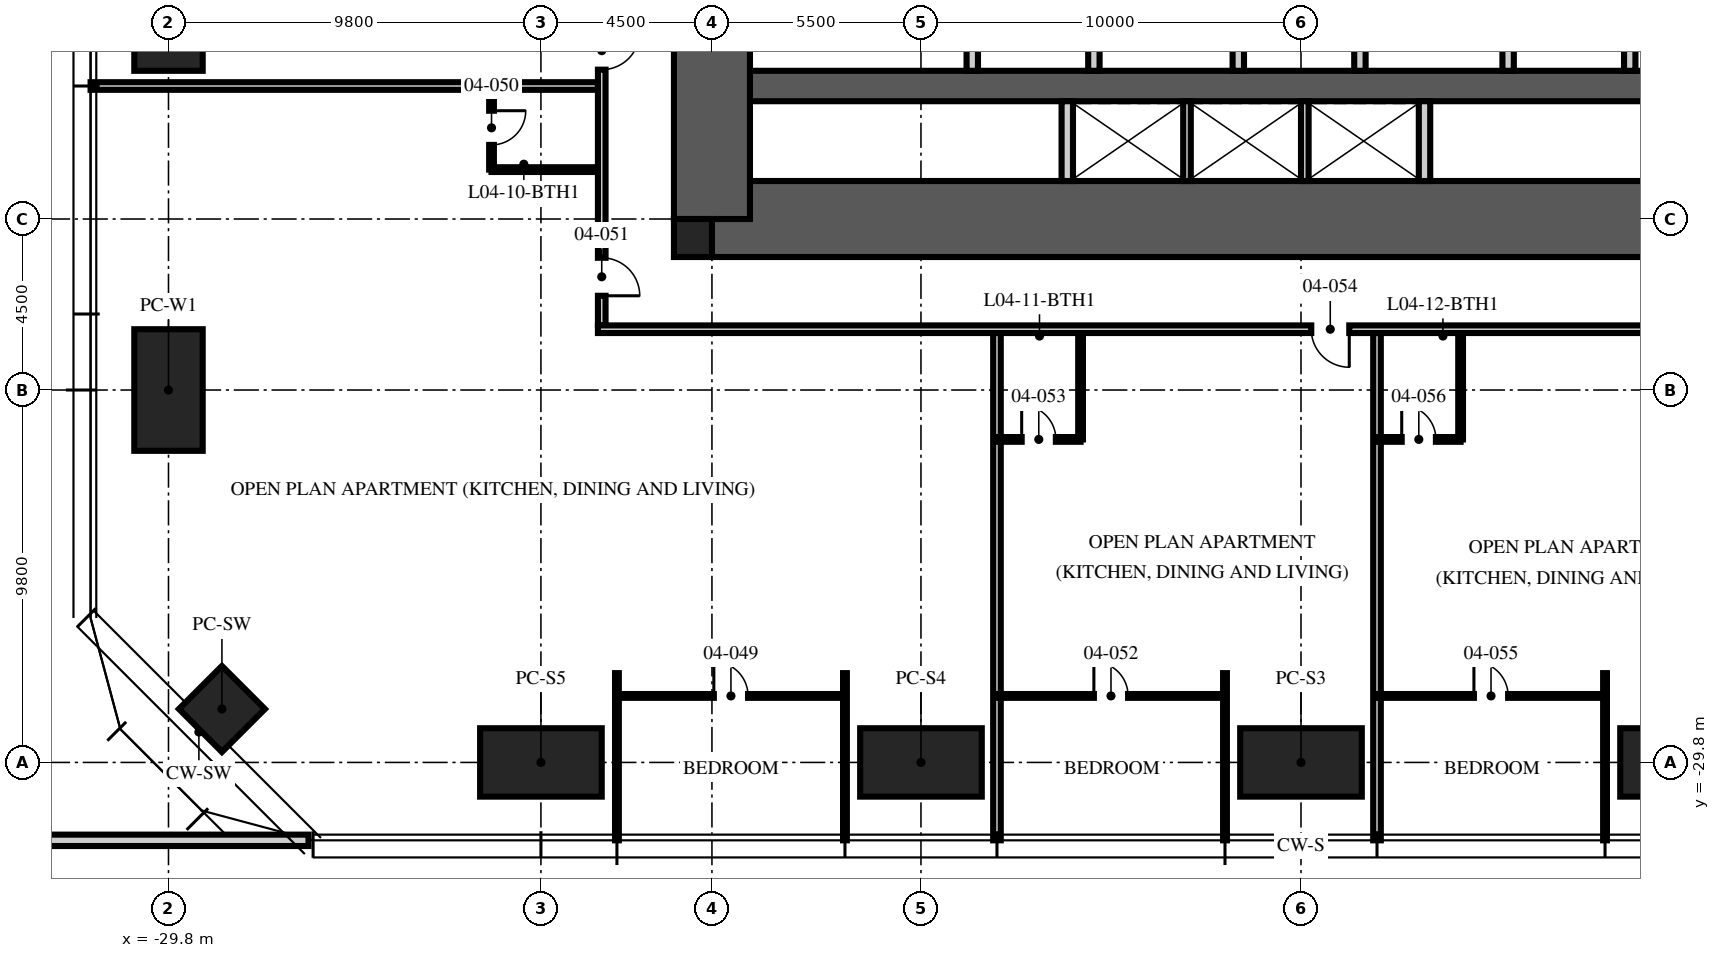
"""IFC4 building model, lengths in metres.
Left out: names, types, materials, properties, quantities, classifications, styles, units other than length and angle.
Written with IfcOpenShell. Run it as: python <this file> out.ifc"""

import sys

from ifc_helpers import new_model, si_unit, direction, frame, frame_2d, origin, origin_2d, place, context, subcontext, project, spatial, rectangle, hollow_rectangle, extrude, element, fill, save


model = new_model("IFC4")
c1 = context("Model", 3, precision=1e-05, world=origin(), true_north=direction((0.0, 1.0)))
c2 = subcontext(c1, "Body", "Model", "MODEL_VIEW")
j1 = project(units=[si_unit("LENGTHUNIT", "METRE"), si_unit("PLANEANGLEUNIT", "RADIAN")], contexts=[c1])
p1 = place(None, origin())
s1 = spatial("IfcSite", under=j1, at=p1, CompositionType="ELEMENT")
p2 = place(p1, origin())
s2 = spatial("IfcBuilding", under=s1, at=p2, CompositionType="ELEMENT")
p3 = place(p2, frame((0.0, 0.0, 21.0)))
s3 = spatial("IfcBuildingStorey", under=s2, at=p3, CompositionType="ELEMENT", Elevation=21.0)
p4 = place(p3, frame((-15.5, -15.5, -0.25), z_axis=(0.0, 0.0, 1.0), x_axis=(1.0, 0.0, 0.0)))
e1 = element("IfcWall", 1, at=p4, inside=s3, PredefinedType="SHEAR", context=c2, shape_type="SweptSolid", body=[
    extrude(rectangle(XDim=31.0, YDim=2.0, at=frame_2d((15.5, 0.0))), origin(), (0.0, 0.0, 1.0), 3.75),
])
p5 = place(p3, frame((-15.5, -12.0, -0.25), z_axis=(0.0, 0.0, 1.0), x_axis=(1.0, 0.0, 0.0)))
e2 = element("IfcWall", 2, at=p5, inside=s3, PredefinedType="SHEAR", context=c2, shape_type="SweptSolid", body=[
    extrude(rectangle(XDim=31.0, YDim=0.8, at=frame_2d((15.5, 0.0))), origin(), (0.0, 0.0, 1.0), 3.75),
])
p6 = place(p3, frame((-15.5, -15.5, -0.25), z_axis=(0.0, 0.0, 1.0), x_axis=(0.0, 1.0, 0.0)))
e3 = element("IfcWall", 3, at=p6, inside=s3, PredefinedType="SHEAR", context=c2, shape_type="SweptSolid", body=[
    extrude(rectangle(XDim=31.0, YDim=2.0, at=frame_2d((15.5, 0.0))), origin(), (0.0, 0.0, 1.0), 3.75),
])
p7 = place(p6, frame((6.5, 0.0, 0.25)))
e4 = element("IfcOpeningElement", 4, at=p7, cuts=e3, PredefinedType="OPENING", context=c2, shape_type="SweptSolid", body=[
    extrude(rectangle(XDim=1.2, YDim=2.1, at=frame_2d((0.6, 1.05))), frame((0.0, 1.01, 0.0), z_axis=(0.0, -1.0, 0.0), x_axis=(1.0, 0.0, 0.0)), (0.0, 0.0, 1.0), 2.02),
])
p8 = place(p6, frame((23.0, 0.0, 0.25)))
e5 = element("IfcOpeningElement", 5, at=p8, cuts=e3, PredefinedType="OPENING", context=c2, shape_type="SweptSolid", body=[
    extrude(rectangle(XDim=1.8, YDim=2.1, at=frame_2d((0.9, 1.05))), frame((0.0, 1.01, 0.0), z_axis=(0.0, -1.0, 0.0), x_axis=(1.0, 0.0, 0.0)), (0.0, 0.0, 1.0), 2.02),
])
p9 = place(p3, frame((-16.0, -16.0, -0.25), z_axis=(0.0, 0.0, 1.0), x_axis=(1.0, 0.0, 0.0)))
e6 = element("IfcColumn", 6, at=p9, inside=s3, PredefinedType="COLUMN", context=c2, shape_type="SweptSolid", body=[
    extrude(rectangle(XDim=1.0, YDim=1.0, at=origin_2d()), origin(), (0.0, 0.0, 1.0), 3.75),
])
for number, where, z_axis, x_axis in (
    (7, (10.0, -29.8, 0.0), (0.0, 0.0, 1.0), (1.0, 0.0, 0.0)),
    (8, (0.0, -29.8, 0.0), (0.0, 0.0, 1.0), (1.0, 0.0, 0.0)),
    (9, (-10.0, -29.8, 0.0), (0.0, 0.0, 1.0), (1.0, 0.0, 0.0)),
    (10, (-20.0, -29.8, 0.0), (0.0, 0.0, 1.0), (1.0, 0.0, 0.0)),
    (11, (-29.8, -20.0, 0.0), (0.0, 0.0, 1.0), (0.0, 1.0, 0.0)),
    (12, (-29.8, -10.0, 0.0), (0.0, 0.0, 1.0), (0.0, 1.0, 0.0)),
):
    element("IfcColumn", number, at=place(p3, frame(where, z_axis=z_axis, x_axis=x_axis)), inside=s3, PredefinedType="COLUMN", context=c2, shape_type="SweptSolid", body=[
        extrude(hollow_rectangle(XDim=3.2, YDim=1.8, WallThickness=0.2, at=origin_2d()), origin(), (0.0, 0.0, 1.0), 3.75),
    ])
p10 = place(p3, frame((-28.394, -28.394, 0.0), z_axis=(0.0, 0.0, 1.0), x_axis=(0.707106781187, -0.707106781187, 0.0)))
e13 = element("IfcColumn", 13, at=p10, inside=s3, PredefinedType="COLUMN", context=c2, shape_type="SweptSolid", body=[
    extrude(hollow_rectangle(XDim=1.6, YDim=1.6, WallThickness=0.1, at=origin_2d()), origin(), (0.0, 0.0, 1.0), 3.75),
])
p11 = place(p3, frame((-38.0, -31.85, 0.0), z_axis=(0.0, 0.0, 1.0), x_axis=(1.0, 0.0, 0.0)))
e14 = element("IfcWall", 14, at=p11, inside=s3, PredefinedType="PARAPET", context=c2, shape_type="SweptSolid", body=[
    extrude(rectangle(XDim=11.884, YDim=0.3, at=frame_2d((5.942, 0.0))), origin(), (0.0, 0.0, 1.0), 1.2),
])
p12 = place(p3, frame((-8.65, -11.6, 0.0), z_axis=(0.0, 0.0, 1.0), x_axis=(0.0, 1.0, 0.0)))
e15 = element("IfcWall", 15, at=p12, inside=s3, PredefinedType="PARTITIONING", context=c2, shape_type="SweptSolid", body=[
    extrude(rectangle(XDim=6.7, YDim=0.3, at=frame_2d((3.35, 0.0))), origin(), (0.0, 0.0, 1.0), 3.5),
])
p13 = place(p12, frame((2.85, 0.0, 0.0)))
e16 = element("IfcOpeningElement", 16, at=p13, cuts=e15, PredefinedType="OPENING", context=c2, shape_type="SweptSolid", body=[
    extrude(rectangle(XDim=1.1, YDim=2.1, at=frame_2d((0.55, 1.05))), frame((0.0, 0.16, 0.0), z_axis=(0.0, -1.0, 0.0), x_axis=(1.0, 0.0, 0.0)), (0.0, 0.0, 1.0), 0.32),
])
p14 = place(p3, frame((8.65, -11.6, 0.0), z_axis=(0.0, 0.0, 1.0), x_axis=(0.0, 1.0, 0.0)))
e17 = element("IfcWall", 17, at=p14, inside=s3, PredefinedType="PARTITIONING", context=c2, shape_type="SweptSolid", body=[
    extrude(rectangle(XDim=6.7, YDim=0.3, at=frame_2d((3.35, 0.0))), origin(), (0.0, 0.0, 1.0), 3.5),
])
p15 = place(p14, frame((2.85, 0.0, 0.0)))
e18 = element("IfcOpeningElement", 18, at=p15, cuts=e17, PredefinedType="OPENING", context=c2, shape_type="SweptSolid", body=[
    extrude(rectangle(XDim=1.1, YDim=2.1, at=frame_2d((0.55, 1.05))), frame((0.0, 0.16, 0.0), z_axis=(0.0, -1.0, 0.0), x_axis=(1.0, 0.0, 0.0)), (0.0, 0.0, 1.0), 0.32),
])
for number, where, z_axis, x_axis in (
    (19, (-5.45, -11.6, 0.0), (0.0, 0.0, 1.0), (0.0, 1.0, 0.0)),
    (20, (-1.65, -11.6, 0.0), (0.0, 0.0, 1.0), (0.0, 1.0, 0.0)),
    (21, (1.55, -11.6, 0.0), (0.0, 0.0, 1.0), (0.0, 1.0, 0.0)),
    (22, (5.45, -11.6, 0.0), (0.0, 0.0, 1.0), (0.0, 1.0, 0.0)),
):
    element("IfcWall", number, at=place(p3, frame(where, z_axis=z_axis, x_axis=x_axis)), inside=s3, PredefinedType="PARTITIONING", context=c2, shape_type="SweptSolid", body=[
        extrude(rectangle(XDim=4.8, YDim=0.3, at=frame_2d((2.4, 0.0))), origin(), (0.0, 0.0, 1.0), 3.5),
    ])
for number, where, z_axis, x_axis in (
    (23, (-6.15, -14.5, 0.0), (0.0, 0.0, 1.0), (0.0, 1.0, 0.0)),
    (24, (3.25, -14.5, 0.0), (0.0, 0.0, 1.0), (0.0, 1.0, 0.0)),
):
    element("IfcWall", number, at=place(p3, frame(where, z_axis=z_axis, x_axis=x_axis)), inside=s3, PredefinedType="PARTITIONING", context=c2, shape_type="SweptSolid", body=[
        extrude(rectangle(XDim=2.1, YDim=0.3, at=frame_2d((1.05, 0.0))), origin(), (0.0, 0.0, 1.0), 3.5),
    ])
for number, where, z_axis, x_axis in (
    (25, (-3.0, -14.5, 0.0), (0.0, 0.0, 1.0), (0.0, 1.0, 0.0)),
    (26, (0.1, -14.5, 0.0), (0.0, 0.0, 1.0), (0.0, 1.0, 0.0)),
):
    element("IfcWall", number, at=place(p3, frame(where, z_axis=z_axis, x_axis=x_axis)), inside=s3, PredefinedType="PARTITIONING", context=c2, shape_type="SweptSolid", body=[
        extrude(rectangle(XDim=2.1, YDim=0.2, at=frame_2d((1.05, 0.0))), origin(), (0.0, 0.0, 1.0), 3.5),
    ])
p16 = place(p3, frame((-18.5, -12.0, 0.0), z_axis=(0.0, 0.0, 1.0), x_axis=(-1.0, 0.0, 0.0)))
e27 = element("IfcWall", 27, at=p16, inside=s3, PredefinedType="PARTITIONING", context=c2, shape_type="SweptSolid", body=[
    extrude(rectangle(XDim=13.35, YDim=0.2, at=frame_2d((6.675, 0.0))), origin(), (0.0, 0.0, 1.0), 2.71),
])
for number, where, z_axis, x_axis in (
    (28, (-18.0, -27.45, 0.0), (0.0, 0.0, 1.0), (0.0, -1.0, 0.0)),
    (29, (-12.0, -27.45, 0.0), (0.0, 0.0, 1.0), (0.0, -1.0, 0.0)),
):
    element("IfcWall", number, at=place(p3, frame(where, z_axis=z_axis, x_axis=x_axis)), inside=s3, PredefinedType="PARTITIONING", context=c2, shape_type="SweptSolid", body=[
        extrude(rectangle(XDim=4.4, YDim=0.1, at=frame_2d((2.2, 0.0))), origin(), (0.0, 0.0, 1.0), 2.71),
    ])
p17 = place(p3, frame((-8.0, -18.5, 0.0), z_axis=(0.0, 0.0, 1.0), x_axis=(0.0, -1.0, 0.0)))
e30 = element("IfcWall", 30, at=p17, inside=s3, PredefinedType="PARTITIONING", context=c2, shape_type="SweptSolid", body=[
    extrude(rectangle(XDim=13.35, YDim=0.2, at=frame_2d((6.675, 0.0))), origin(), (0.0, 0.0, 1.0), 2.71),
])
p18 = place(p3, frame((-2.0, -27.45, 0.0), z_axis=(0.0, 0.0, 1.0), x_axis=(0.0, -1.0, 0.0)))
e31 = element("IfcWall", 31, at=p18, inside=s3, PredefinedType="PARTITIONING", context=c2, shape_type="SweptSolid", body=[
    extrude(rectangle(XDim=4.4, YDim=0.1, at=frame_2d((2.2, 0.0))), origin(), (0.0, 0.0, 1.0), 2.71),
])
p19 = place(p3, frame((2.0, -18.5, 0.0), z_axis=(0.0, 0.0, 1.0), x_axis=(0.0, -1.0, 0.0)))
e32 = element("IfcWall", 32, at=p19, inside=s3, PredefinedType="PARTITIONING", context=c2, shape_type="SweptSolid", body=[
    extrude(rectangle(XDim=13.35, YDim=0.2, at=frame_2d((6.675, 0.0))), origin(), (0.0, 0.0, 1.0), 2.71),
])
p20 = place(p3, frame((8.0, -27.45, 0.0), z_axis=(0.0, 0.0, 1.0), x_axis=(0.0, -1.0, 0.0)))
e33 = element("IfcWall", 33, at=p20, inside=s3, PredefinedType="PARTITIONING", context=c2, shape_type="SweptSolid", body=[
    extrude(rectangle(XDim=4.4, YDim=0.1, at=frame_2d((2.2, 0.0))), origin(), (0.0, 0.0, 1.0), 2.71),
])
p21 = place(p3, frame((-18.0, -28.05, 0.0), z_axis=(0.0, 0.0, 1.0), x_axis=(1.0, 0.0, 0.0)))
e34 = element("IfcWall", 34, at=p21, inside=s3, PredefinedType="PARTITIONING", context=c2, shape_type="SweptSolid", body=[
    extrude(rectangle(XDim=6.0, YDim=0.1, at=frame_2d((3.0, 0.0))), origin(), (0.0, 0.0, 1.0), 2.61),
])
p22 = place(p21, frame((2.55, 0.0, 0.0)))
e35 = element("IfcOpeningElement", 35, at=p22, cuts=e34, PredefinedType="OPENING", context=c2, shape_type="SweptSolid", body=[
    extrude(rectangle(XDim=0.9, YDim=2.1, at=frame_2d((0.45, 1.05))), frame((0.0, 0.06, 0.0), z_axis=(0.0, -1.0, 0.0), x_axis=(1.0, 0.0, 0.0)), (0.0, 0.0, 1.0), 0.12),
])
p23 = place(p3, frame((-21.3, -12.0, 0.0), z_axis=(0.0, 0.0, 1.0), x_axis=(0.0, -1.0, 0.0)))
e36 = element("IfcWall", 36, at=p23, inside=s3, PredefinedType="PARTITIONING", context=c2, shape_type="SweptSolid", body=[
    extrude(rectangle(XDim=2.2, YDim=0.125, at=frame_2d((1.1, 0.0))), origin(), (0.0, 0.0, 1.0), 3.5),
])
p24 = place(p23, frame((0.65, 0.0, 0.0)))
e37 = element("IfcOpeningElement", 37, at=p24, cuts=e36, PredefinedType="OPENING", context=c2, shape_type="SweptSolid", body=[
    extrude(rectangle(XDim=0.9, YDim=2.1, at=frame_2d((0.45, 1.05))), frame((0.0, 0.073, 0.0), z_axis=(0.0, -1.0, 0.0), x_axis=(1.0, 0.0, 0.0)), (0.0, 0.0, 1.0), 0.145),
])
p25 = place(p3, frame((-18.5, -14.2, 0.0), z_axis=(0.0, 0.0, 1.0), x_axis=(-1.0, 0.0, 0.0)))
e38 = element("IfcWall", 38, at=p25, inside=s3, PredefinedType="PARTITIONING", context=c2, shape_type="SweptSolid", body=[
    extrude(rectangle(XDim=2.8, YDim=0.125, at=frame_2d((1.4, 0.0))), origin(), (0.0, 0.0, 1.0), 3.5),
])
p26 = place(p3, frame((-8.0, -28.05, 0.0), z_axis=(0.0, 0.0, 1.0), x_axis=(1.0, 0.0, 0.0)))
e39 = element("IfcWall", 39, at=p26, inside=s3, PredefinedType="PARTITIONING", context=c2, shape_type="SweptSolid", body=[
    extrude(rectangle(XDim=6.0, YDim=0.1, at=frame_2d((3.0, 0.0))), origin(), (0.0, 0.0, 1.0), 2.61),
])
p27 = place(p26, frame((2.55, 0.0, 0.0)))
e40 = element("IfcOpeningElement", 40, at=p27, cuts=e39, PredefinedType="OPENING", context=c2, shape_type="SweptSolid", body=[
    extrude(rectangle(XDim=0.9, YDim=2.1, at=frame_2d((0.45, 1.05))), frame((0.0, 0.06, 0.0), z_axis=(0.0, -1.0, 0.0), x_axis=(1.0, 0.0, 0.0)), (0.0, 0.0, 1.0), 0.12),
])
p28 = place(p3, frame((-8.0, -21.3, 0.0), z_axis=(0.0, 0.0, 1.0), x_axis=(1.0, 0.0, 0.0)))
e41 = element("IfcWall", 41, at=p28, inside=s3, PredefinedType="PARTITIONING", context=c2, shape_type="SweptSolid", body=[
    extrude(rectangle(XDim=2.2, YDim=0.125, at=frame_2d((1.1, 0.0))), origin(), (0.0, 0.0, 1.0), 3.5),
])
p29 = place(p28, frame((0.65, 0.0, 0.0)))
e42 = element("IfcOpeningElement", 42, at=p29, cuts=e41, PredefinedType="OPENING", context=c2, shape_type="SweptSolid", body=[
    extrude(rectangle(XDim=0.9, YDim=2.1, at=frame_2d((0.45, 1.05))), frame((0.0, 0.073, 0.0), z_axis=(0.0, -1.0, 0.0), x_axis=(1.0, 0.0, 0.0)), (0.0, 0.0, 1.0), 0.145),
])
p30 = place(p3, frame((-5.8, -18.5, 0.0), z_axis=(0.0, 0.0, 1.0), x_axis=(0.0, -1.0, 0.0)))
e43 = element("IfcWall", 43, at=p30, inside=s3, PredefinedType="PARTITIONING", context=c2, shape_type="SweptSolid", body=[
    extrude(rectangle(XDim=2.8, YDim=0.125, at=frame_2d((1.4, 0.0))), origin(), (0.0, 0.0, 1.0), 3.5),
])
p31 = place(p3, frame((2.0, -28.05, 0.0), z_axis=(0.0, 0.0, 1.0), x_axis=(1.0, 0.0, 0.0)))
e44 = element("IfcWall", 44, at=p31, inside=s3, PredefinedType="PARTITIONING", context=c2, shape_type="SweptSolid", body=[
    extrude(rectangle(XDim=6.0, YDim=0.1, at=frame_2d((3.0, 0.0))), origin(), (0.0, 0.0, 1.0), 2.61),
])
p32 = place(p31, frame((2.55, 0.0, 0.0)))
e45 = element("IfcOpeningElement", 45, at=p32, cuts=e44, PredefinedType="OPENING", context=c2, shape_type="SweptSolid", body=[
    extrude(rectangle(XDim=0.9, YDim=2.1, at=frame_2d((0.45, 1.05))), frame((0.0, 0.06, 0.0), z_axis=(0.0, -1.0, 0.0), x_axis=(1.0, 0.0, 0.0)), (0.0, 0.0, 1.0), 0.12),
])
p33 = place(p3, frame((2.0, -21.3, 0.0), z_axis=(0.0, 0.0, 1.0), x_axis=(1.0, 0.0, 0.0)))
e46 = element("IfcWall", 46, at=p33, inside=s3, PredefinedType="PARTITIONING", context=c2, shape_type="SweptSolid", body=[
    extrude(rectangle(XDim=2.2, YDim=0.125, at=frame_2d((1.1, 0.0))), origin(), (0.0, 0.0, 1.0), 3.5),
])
p34 = place(p33, frame((0.65, 0.0, 0.0)))
e47 = element("IfcOpeningElement", 47, at=p34, cuts=e46, PredefinedType="OPENING", context=c2, shape_type="SweptSolid", body=[
    extrude(rectangle(XDim=0.9, YDim=2.1, at=frame_2d((0.45, 1.05))), frame((0.0, 0.073, 0.0), z_axis=(0.0, -1.0, 0.0), x_axis=(1.0, 0.0, 0.0)), (0.0, 0.0, 1.0), 0.145),
])
p35 = place(p3, frame((4.2, -18.5, 0.0), z_axis=(0.0, 0.0, 1.0), x_axis=(0.0, -1.0, 0.0)))
e48 = element("IfcWall", 48, at=p35, inside=s3, PredefinedType="PARTITIONING", context=c2, shape_type="SweptSolid", body=[
    extrude(rectangle(XDim=2.8, YDim=0.125, at=frame_2d((1.4, 0.0))), origin(), (0.0, 0.0, 1.0), 3.5),
])
p36 = place(p3, frame((-18.4, 18.3, 0.0), z_axis=(0.0, 0.0, 1.0), x_axis=(0.0, -1.0, 0.0)))
e49 = element("IfcWall", 49, at=p36, inside=s3, PredefinedType="PARTITIONING", context=c2, shape_type="SweptSolid", body=[
    extrude(rectangle(XDim=36.6, YDim=0.2, at=frame_2d((18.3, 0.0))), origin(), (0.0, 0.0, 1.0), 2.3),
])
p37 = place(p36, frame((8.57, 0.0, 0.0)))
e50 = element("IfcOpeningElement", 50, at=p37, cuts=e49, PredefinedType="OPENING", context=c2, shape_type="SweptSolid", body=[
    extrude(rectangle(XDim=1.0, YDim=2.2, at=frame_2d((0.5, 1.1))), frame((0.0, 0.11, 0.0), z_axis=(0.0, -1.0, 0.0), x_axis=(1.0, 0.0, 0.0)), (0.0, 0.0, 1.0), 0.22),
])
p38 = place(p36, frame((24.57, 0.0, 0.0)))
e51 = element("IfcOpeningElement", 51, at=p38, cuts=e49, PredefinedType="OPENING", context=c2, shape_type="SweptSolid", body=[
    extrude(rectangle(XDim=1.0, YDim=2.2, at=frame_2d((0.5, 1.1))), frame((0.0, 0.11, 0.0), z_axis=(0.0, -1.0, 0.0), x_axis=(1.0, 0.0, 0.0)), (0.0, 0.0, 1.0), 0.22),
])
p39 = place(p36, frame((28.87, 0.0, 0.0)))
e52 = element("IfcOpeningElement", 52, at=p39, cuts=e49, PredefinedType="OPENING", context=c2, shape_type="SweptSolid", body=[
    extrude(rectangle(XDim=1.0, YDim=2.2, at=frame_2d((0.5, 1.1))), frame((0.0, 0.11, 0.0), z_axis=(0.0, -1.0, 0.0), x_axis=(1.0, 0.0, 0.0)), (0.0, 0.0, 1.0), 0.22),
])
p40 = place(p36, frame((34.82, 0.0, 0.0)))
e53 = element("IfcOpeningElement", 53, at=p40, cuts=e49, PredefinedType="OPENING", context=c2, shape_type="SweptSolid", body=[
    extrude(rectangle(XDim=1.0, YDim=2.2, at=frame_2d((0.5, 1.1))), frame((0.0, 0.11, 0.0), z_axis=(0.0, -1.0, 0.0), x_axis=(1.0, 0.0, 0.0)), (0.0, 0.0, 1.0), 0.22),
])
p41 = place(p3, frame((10.0, -18.4, 0.0), z_axis=(0.0, 0.0, 1.0), x_axis=(-1.0, 0.0, 0.0)))
e54 = element("IfcWall", 54, at=p41, inside=s3, PredefinedType="PARTITIONING", context=c2, shape_type="SweptSolid", body=[
    extrude(rectangle(XDim=28.5, YDim=0.2, at=frame_2d((14.25, 0.0))), origin(), (0.0, 0.0, 1.0), 2.3),
])
p42 = place(p41, frame((8.73, 0.0, 0.0)))
e55 = element("IfcOpeningElement", 55, at=p42, cuts=e54, PredefinedType="OPENING", context=c2, shape_type="SweptSolid", body=[
    extrude(rectangle(XDim=1.0, YDim=2.2, at=frame_2d((0.5, 1.1))), frame((0.0, 0.11, 0.0), z_axis=(0.0, -1.0, 0.0), x_axis=(1.0, 0.0, 0.0)), (0.0, 0.0, 1.0), 0.22),
])
p43 = place(p39, origin())
e56 = element("IfcDoor", 56, at=p43, inside=s3, OperationType="SINGLE_SWING_LEFT", PredefinedType="DOOR", context=c2, shape_type="SweptSolid", body=[
    extrude(rectangle(XDim=1.0, YDim=2.2, at=frame_2d((0.5, 1.1))), frame((0.0, 0.025, 0.0), z_axis=(0.0, -1.0, 0.0), x_axis=(1.0, 0.0, 0.0)), (0.0, 0.0, 1.0), 0.05),
])
fill(e52, e56)
p44 = place(p22, origin())
e57 = element("IfcDoor", 57, at=p44, inside=s3, OperationType="SINGLE_SWING_LEFT", PredefinedType="DOOR", context=c2, shape_type="SweptSolid", body=[
    extrude(rectangle(XDim=0.9, YDim=2.1, at=frame_2d((0.45, 1.05))), frame((0.0, 0.025, 0.0), z_axis=(0.0, -1.0, 0.0), x_axis=(1.0, 0.0, 0.0)), (0.0, 0.0, 1.0), 0.05),
])
fill(e35, e57)
p45 = place(p24, origin())
e58 = element("IfcDoor", 58, at=p45, inside=s3, OperationType="SINGLE_SWING_LEFT", PredefinedType="DOOR", context=c2, shape_type="SweptSolid", body=[
    extrude(rectangle(XDim=0.9, YDim=2.1, at=frame_2d((0.45, 1.05))), frame((0.0, 0.025, 0.0), z_axis=(0.0, -1.0, 0.0), x_axis=(1.0, 0.0, 0.0)), (0.0, 0.0, 1.0), 0.05),
])
fill(e37, e58)
p46 = place(p40, origin())
e59 = element("IfcDoor", 59, at=p46, inside=s3, OperationType="SINGLE_SWING_RIGHT", PredefinedType="DOOR", context=c2, shape_type="SweptSolid", body=[
    extrude(rectangle(XDim=1.0, YDim=2.2, at=frame_2d((0.5, 1.1))), frame((0.0, 0.025, 0.0), z_axis=(0.0, -1.0, 0.0), x_axis=(1.0, 0.0, 0.0)), (0.0, 0.0, 1.0), 0.05),
])
fill(e53, e59)
p47 = place(p27, origin())
e60 = element("IfcDoor", 60, at=p47, inside=s3, OperationType="SINGLE_SWING_LEFT", PredefinedType="DOOR", context=c2, shape_type="SweptSolid", body=[
    extrude(rectangle(XDim=0.9, YDim=2.1, at=frame_2d((0.45, 1.05))), frame((0.0, 0.025, 0.0), z_axis=(0.0, -1.0, 0.0), x_axis=(1.0, 0.0, 0.0)), (0.0, 0.0, 1.0), 0.05),
])
fill(e40, e60)
p48 = place(p29, origin())
e61 = element("IfcDoor", 61, at=p48, inside=s3, OperationType="SINGLE_SWING_LEFT", PredefinedType="DOOR", context=c2, shape_type="SweptSolid", body=[
    extrude(rectangle(XDim=0.9, YDim=2.1, at=frame_2d((0.45, 1.05))), frame((0.0, 0.025, 0.0), z_axis=(0.0, -1.0, 0.0), x_axis=(1.0, 0.0, 0.0)), (0.0, 0.0, 1.0), 0.05),
])
fill(e42, e61)
p49 = place(p42, origin())
e62 = element("IfcDoor", 62, at=p49, inside=s3, OperationType="SINGLE_SWING_LEFT", PredefinedType="DOOR", context=c2, shape_type="SweptSolid", body=[
    extrude(rectangle(XDim=1.0, YDim=2.2, at=frame_2d((0.5, 1.1))), frame((0.0, 0.025, 0.0), z_axis=(0.0, -1.0, 0.0), x_axis=(1.0, 0.0, 0.0)), (0.0, 0.0, 1.0), 0.05),
])
fill(e55, e62)
p50 = place(p32, origin())
e63 = element("IfcDoor", 63, at=p50, inside=s3, OperationType="SINGLE_SWING_LEFT", PredefinedType="DOOR", context=c2, shape_type="SweptSolid", body=[
    extrude(rectangle(XDim=0.9, YDim=2.1, at=frame_2d((0.45, 1.05))), frame((0.0, 0.025, 0.0), z_axis=(0.0, -1.0, 0.0), x_axis=(1.0, 0.0, 0.0)), (0.0, 0.0, 1.0), 0.05),
])
fill(e45, e63)
p51 = place(p34, origin())
e64 = element("IfcDoor", 64, at=p51, inside=s3, OperationType="SINGLE_SWING_LEFT", PredefinedType="DOOR", context=c2, shape_type="SweptSolid", body=[
    extrude(rectangle(XDim=0.9, YDim=2.1, at=frame_2d((0.45, 1.05))), frame((0.0, 0.025, 0.0), z_axis=(0.0, -1.0, 0.0), x_axis=(1.0, 0.0, 0.0)), (0.0, 0.0, 1.0), 0.05),
])
fill(e47, e64)
save(model, sys.argv[1])
